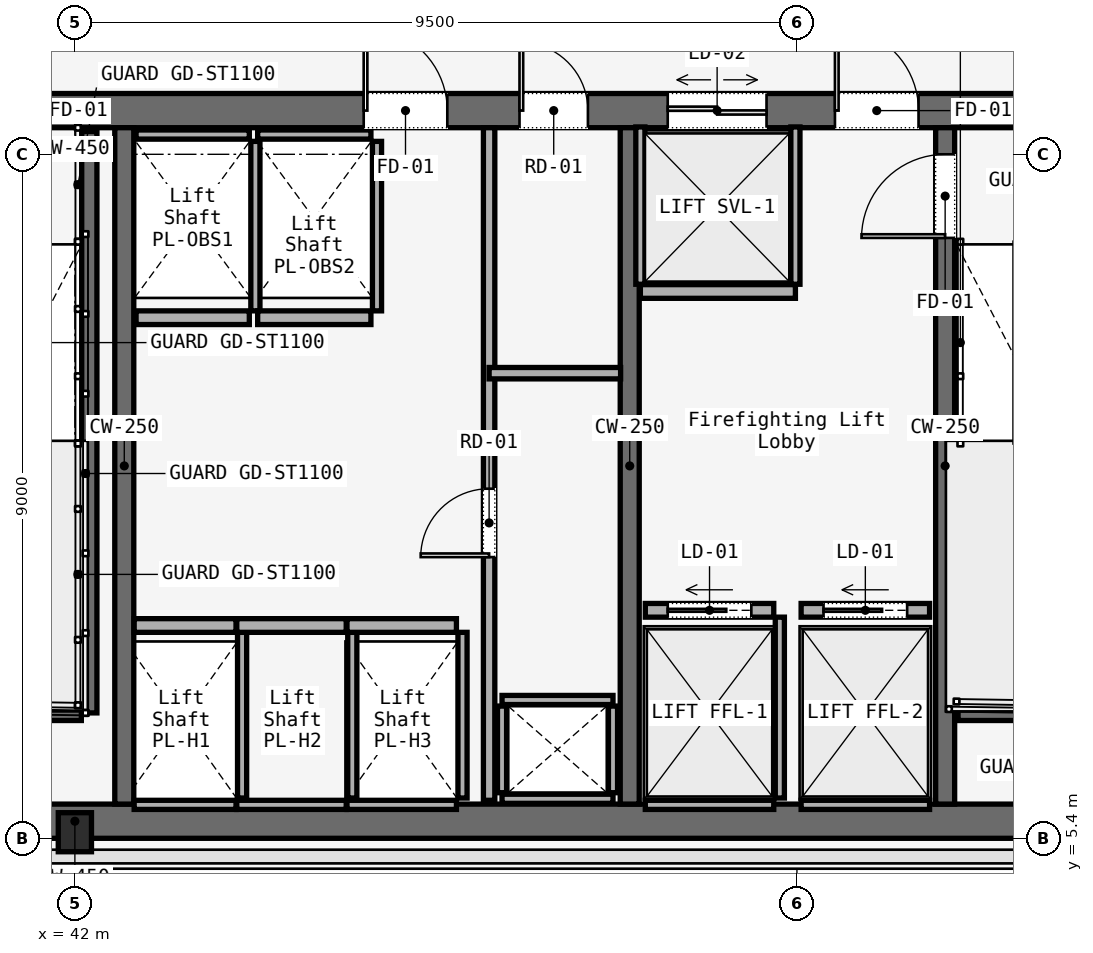
"""IFC4 building model, lengths in metres.
Left out: names, types, materials, properties, quantities, classifications, styles, units other than length and angle.
Written with IfcOpenShell. Run it as: python <this file> out.ifc"""

import sys

from ifc_helpers import new_model, si_unit, direction, frame, frame_2d, origin, origin_2d, place, context, subcontext, project, spatial, rectangle, i_section, extrude, element, fill, save


model = new_model("IFC4")
c1 = context("Model", 3, precision=1e-05, world=origin(), true_north=direction((0.0, 1.0)))
c2 = subcontext(c1, "Body", "Model", "MODEL_VIEW")
j1 = project(units=[si_unit("LENGTHUNIT", "METRE"), si_unit("PLANEANGLEUNIT", "RADIAN")], contexts=[c1])
p1 = place(None, origin())
s1 = spatial("IfcSite", under=j1, at=p1, CompositionType="ELEMENT")
p2 = place(p1, origin())
s2 = spatial("IfcBuilding", under=s1, at=p2, CompositionType="ELEMENT")
p3 = place(p2, frame((0.0, 0.0, 104.4)))
s3 = spatial("IfcBuildingStorey", under=s2, at=p3, CompositionType="ELEMENT", Elevation=104.4)
p4 = place(p3, frame((26.45, 14.975, 0.0), z_axis=(0.0, 0.0, 1.0), x_axis=(1.0, 0.0, 0.0)))
e1 = element("IfcWall", 1, at=p4, inside=s3, PredefinedType="SOLIDWALL", context=c2, shape_type="SweptSolid", body=[
    extrude(rectangle(XDim=31.1, YDim=0.45, at=frame_2d((15.55, 0.0))), origin(), (0.0, 0.0, 1.0), 3.58),
])
p5 = place(p4, frame((1.65, 0.0, 0.0)))
e2 = element("IfcOpeningElement", 2, at=p5, cuts=e1, PredefinedType="OPENING", context=c2, shape_type="SweptSolid", body=[
    extrude(rectangle(XDim=1.1, YDim=2.2, at=frame_2d((0.55, 1.1))), frame((0.0, 0.225, 0.0), z_axis=(0.0, -1.0, 0.0), x_axis=(1.0, 0.0, 0.0)), (0.0, 0.0, 1.0), 0.45),
])
p6 = place(p4, frame((13.65, 0.0, 0.0)))
e3 = element("IfcOpeningElement", 3, at=p6, cuts=e1, PredefinedType="OPENING", context=c2, shape_type="SweptSolid", body=[
    extrude(rectangle(XDim=1.1, YDim=2.2, at=frame_2d((0.55, 1.1))), frame((0.0, 0.225, 0.0), z_axis=(0.0, -1.0, 0.0), x_axis=(1.0, 0.0, 0.0)), (0.0, 0.0, 1.0), 0.45),
])
p7 = place(p4, frame((25.55, 0.0, 0.0)))
e4 = element("IfcOpeningElement", 4, at=p7, cuts=e1, PredefinedType="OPENING", context=c2, shape_type="SweptSolid", body=[
    extrude(rectangle(XDim=1.1, YDim=2.2, at=frame_2d((0.55, 1.1))), frame((0.0, 0.225, 0.0), z_axis=(0.0, -1.0, 0.0), x_axis=(1.0, 0.0, 0.0)), (0.0, 0.0, 1.0), 0.45),
])
p8 = place(p4, frame((10.7, 0.0, 0.0)))
e5 = element("IfcOpeningElement", 5, at=p8, cuts=e1, PredefinedType="OPENING", context=c2, shape_type="SweptSolid", body=[
    extrude(rectangle(XDim=1.4, YDim=2.2, at=frame_2d((0.7, 1.1))), frame((0.0, 0.225, 0.0), z_axis=(0.0, -1.0, 0.0), x_axis=(1.0, 0.0, 0.0)), (0.0, 0.0, 1.0), 0.45),
])
p9 = place(p4, frame((19.35, 0.0, 0.0)))
e6 = element("IfcOpeningElement", 6, at=p9, cuts=e1, PredefinedType="OPENING", context=c2, shape_type="SweptSolid", body=[
    extrude(rectangle(XDim=1.1, YDim=2.2, at=frame_2d((0.55, 1.1))), frame((0.0, 0.225, 0.0), z_axis=(0.0, -1.0, 0.0), x_axis=(1.0, 0.0, 0.0)), (0.0, 0.0, 1.0), 0.45),
])
p10 = place(p4, frame((21.4, 0.0, 0.0)))
e7 = element("IfcOpeningElement", 7, at=p10, cuts=e1, PredefinedType="OPENING", context=c2, shape_type="SweptSolid", body=[
    extrude(rectangle(XDim=0.9, YDim=2.1, at=frame_2d((0.45, 1.05))), frame((0.0, 0.225, 0.0), z_axis=(0.0, -1.0, 0.0), x_axis=(1.0, 0.0, 0.0)), (0.0, 0.0, 1.0), 0.45),
])
p11 = place(p4, frame((23.35, 0.0, 0.0)))
e8 = element("IfcOpeningElement", 8, at=p11, cuts=e1, PredefinedType="OPENING", context=c2, shape_type="SweptSolid", body=[
    extrude(rectangle(XDim=1.3, YDim=2.3, at=frame_2d((0.65, 1.15))), frame((0.0, 0.225, 0.0), z_axis=(0.0, -1.0, 0.0), x_axis=(1.0, 0.0, 0.0)), (0.0, 0.0, 1.0), 0.45),
])
p12 = place(p3, frame((26.45, 5.625, 0.0), z_axis=(0.0, 0.0, 1.0), x_axis=(1.0, 0.0, 0.0)))
e9 = element("IfcWall", 9, at=p12, inside=s3, PredefinedType="SOLIDWALL", context=c2, shape_type="SweptSolid", body=[
    extrude(rectangle(XDim=31.1, YDim=0.45, at=frame_2d((15.55, 0.0))), origin(), (0.0, 0.0, 1.0), 3.58),
])
for number, where, z_axis, x_axis in (
    (10, (42.65, 5.85, 0.0), (0.0, 0.0, 1.0), (0.0, 1.0, 0.0)),
    (11, (49.3, 5.85, 0.0), (0.0, 0.0, 1.0), (0.0, 1.0, 0.0)),
):
    element("IfcWall", number, at=place(p3, frame(where, z_axis=z_axis, x_axis=x_axis)), inside=s3, PredefinedType="SOLIDWALL", context=c2, shape_type="SweptSolid", body=[
        extrude(rectangle(XDim=8.9, YDim=0.25, at=frame_2d((4.45, 0.0))), origin(), (0.0, 0.0, 1.0), 3.58),
    ])
p13 = place(p3, frame((53.45, 5.85, 0.0), z_axis=(0.0, 0.0, 1.0), x_axis=(0.0, 1.0, 0.0)))
e12 = element("IfcWall", 12, at=p13, inside=s3, PredefinedType="SOLIDWALL", context=c2, shape_type="SweptSolid", body=[
    extrude(rectangle(XDim=8.9, YDim=0.25, at=frame_2d((4.45, 0.0))), origin(), (0.0, 0.0, 1.0), 3.58),
])
p14 = place(p13, frame((7.45, 0.0, 0.0)))
e13 = element("IfcOpeningElement", 13, at=p14, cuts=e12, PredefinedType="OPENING", context=c2, shape_type="SweptSolid", body=[
    extrude(rectangle(XDim=1.1, YDim=2.2, at=frame_2d((0.55, 1.1))), frame((0.0, 0.125, 0.0), z_axis=(0.0, -1.0, 0.0), x_axis=(1.0, 0.0, 0.0)), (0.0, 0.0, 1.0), 0.25),
])
p15 = place(p3, frame((42.0, 5.48, 0.0), z_axis=(0.0, 0.0, 1.0), x_axis=(1.0, 0.0, 0.0)))
e14 = element("IfcColumn", 14, at=p15, inside=s3, PredefinedType="COLUMN", context=c2, shape_type="SweptSolid", body=[
    extrude(i_section(OverallWidth=0.437, OverallDepth=0.514, WebThickness=0.061, FlangeThickness=0.077, FilletRadius=0.015, at=origin_2d()), origin(), (0.0, 0.0, 1.0), 3.58),
])
p16 = place(p3, frame((42.19, 14.7, 0.0), z_axis=(0.0, 0.0, 1.0), x_axis=(0.0, -1.0, 0.0)))
e15 = element("IfcWall", 15, at=p16, inside=s3, PredefinedType="SOLIDWALL", context=c2, shape_type="SweptSolid", body=[
    extrude(rectangle(XDim=7.65, YDim=0.2, at=frame_2d((3.825, 0.0))), origin(), (0.0, 0.0, 1.0), 3.8),
])
for number, where, z_axis, x_axis in (
    (16, (38.97, 7.05, 0.0), (0.0, 0.0, 1.0), (1.0, 0.0, 0.0)),
    (17, (53.62, 7.05, 0.0), (0.0, 0.0, 1.0), (1.0, 0.0, 0.0)),
):
    element("IfcWall", number, at=place(p3, frame(where, z_axis=z_axis, x_axis=x_axis)), inside=s3, PredefinedType="SOLIDWALL", context=c2, shape_type="SweptSolid", body=[
        extrude(rectangle(XDim=3.115, YDim=0.2, at=frame_2d((1.558, 0.0))), origin(), (0.0, 0.0, 1.0), 3.8),
    ])
for number, where, z_axis, x_axis in (
    (18, (47.62, 5.92, 0.0), (0.0, 0.0, 1.0), (1.0, 0.0, 0.0)),
    (19, (47.62, 7.22, 0.0), (0.0, 0.0, 1.0), (1.0, 0.0, 0.0)),
):
    element("IfcWall", number, at=place(p3, frame(where, z_axis=z_axis, x_axis=x_axis)), inside=s3, PredefinedType="SOLIDWALL", context=c2, shape_type="SweptSolid", body=[
        extrude(rectangle(XDim=1.46, YDim=0.12, at=frame_2d((0.73, 0.0))), origin(), (0.0, 0.0, 1.0), 2.95),
    ])
for number, where, z_axis, x_axis in (
    (20, (47.62, 6.0, 0.0), (0.0, 0.0, 1.0), (0.0, 1.0, 0.0)),
    (21, (49.08, 6.0, 0.0), (0.0, 0.0, 1.0), (0.0, 1.0, 0.0)),
):
    element("IfcWall", number, at=place(p3, frame(where, z_axis=z_axis, x_axis=x_axis)), inside=s3, PredefinedType="SOLIDWALL", context=c2, shape_type="SweptSolid", body=[
        extrude(rectangle(XDim=1.14, YDim=0.12, at=frame_2d((0.57, 0.0))), origin(), (0.0, 0.0, 1.0), 2.95),
    ])
p17 = place(p3, frame((47.45, 5.9, 0.0), z_axis=(0.0, 0.0, 1.0), x_axis=(0.0, 1.0, 0.0)))
e22 = element("IfcWall", 22, at=p17, inside=s3, PredefinedType="PARTITIONING", context=c2, shape_type="SweptSolid", body=[
    extrude(rectangle(XDim=8.85, YDim=0.15, at=frame_2d((4.425, 0.0))), origin(), (0.0, 0.0, 1.0), 2.95),
])
p18 = place(p17, frame((3.2, 0.0, 0.0)))
e23 = element("IfcOpeningElement", 23, at=p18, cuts=e22, PredefinedType="OPENING", context=c2, shape_type="SweptSolid", body=[
    extrude(rectangle(XDim=0.9, YDim=2.1, at=frame_2d((0.45, 1.05))), frame((0.0, 0.075, 0.0), z_axis=(0.0, -1.0, 0.0), x_axis=(1.0, 0.0, 0.0)), (0.0, 0.0, 1.0), 0.15),
])
p19 = place(p3, frame((47.45, 11.52, 0.0), z_axis=(0.0, 0.0, 1.0), x_axis=(1.0, 0.0, 0.0)))
e24 = element("IfcWall", 24, at=p19, inside=s3, PredefinedType="PARTITIONING", context=c2, shape_type="SweptSolid", body=[
    extrude(rectangle(XDim=1.73, YDim=0.15, at=frame_2d((0.865, 0.0))), origin(), (0.0, 0.0, 1.0), 2.95),
])
p20 = place(p3, frame((42.78, 8.2, 0.0), z_axis=(0.0, 0.0, 1.0), x_axis=(1.0, 0.0, 0.0)))
e25 = element("IfcWall", 25, at=p20, inside=s3, PredefinedType="SOLIDWALL", context=c2, shape_type="SweptSolid", body=[
    extrude(rectangle(XDim=1.34, YDim=0.18, at=frame_2d((0.67, 0.0))), origin(), (0.0, 0.0, 1.0), 2.95),
])
p21 = place(p3, frame((42.78, 5.84, 0.0), z_axis=(0.0, 0.0, 1.0), x_axis=(1.0, 0.0, 0.0)))
e26 = element("IfcWall", 26, at=p21, inside=s3, PredefinedType="SOLIDWALL", context=c2, shape_type="SweptSolid", body=[
    extrude(rectangle(XDim=1.34, YDim=0.12, at=frame_2d((0.67, 0.0))), origin(), (0.0, 0.0, 1.0), 2.95),
])
p22 = place(p3, frame((44.2, 5.93, 0.0), z_axis=(0.0, 0.0, 1.0), x_axis=(0.0, 1.0, 0.0)))
e27 = element("IfcWall", 27, at=p22, inside=s3, PredefinedType="SOLIDWALL", context=c2, shape_type="SweptSolid", body=[
    extrude(rectangle(XDim=2.18, YDim=0.12, at=frame_2d((1.09, 0.0))), origin(), (0.0, 0.0, 1.0), 2.95),
])
p23 = place(p3, frame((44.13, 8.2, 0.0), z_axis=(0.0, 0.0, 1.0), x_axis=(1.0, 0.0, 0.0)))
e28 = element("IfcWall", 28, at=p23, inside=s3, PredefinedType="SOLIDWALL", context=c2, shape_type="SweptSolid", body=[
    extrude(rectangle(XDim=1.44, YDim=0.18, at=frame_2d((0.72, 0.0))), origin(), (0.0, 0.0, 1.0), 2.95),
])
p24 = place(p3, frame((44.13, 5.84, 0.0), z_axis=(0.0, 0.0, 1.0), x_axis=(1.0, 0.0, 0.0)))
e29 = element("IfcWall", 29, at=p24, inside=s3, PredefinedType="SOLIDWALL", context=c2, shape_type="SweptSolid", body=[
    extrude(rectangle(XDim=1.44, YDim=0.12, at=frame_2d((0.72, 0.0))), origin(), (0.0, 0.0, 1.0), 2.95),
])
p25 = place(p3, frame((45.65, 5.93, 0.0), z_axis=(0.0, 0.0, 1.0), x_axis=(0.0, 1.0, 0.0)))
e30 = element("IfcWall", 30, at=p25, inside=s3, PredefinedType="SOLIDWALL", context=c2, shape_type="SweptSolid", body=[
    extrude(rectangle(XDim=2.18, YDim=0.12, at=frame_2d((1.09, 0.0))), origin(), (0.0, 0.0, 1.0), 2.95),
])
p26 = place(p3, frame((45.58, 8.2, 0.0), z_axis=(0.0, 0.0, 1.0), x_axis=(1.0, 0.0, 0.0)))
e31 = element("IfcWall", 31, at=p26, inside=s3, PredefinedType="SOLIDWALL", context=c2, shape_type="SweptSolid", body=[
    extrude(rectangle(XDim=1.44, YDim=0.18, at=frame_2d((0.72, 0.0))), origin(), (0.0, 0.0, 1.0), 2.95),
])
p27 = place(p3, frame((45.58, 5.84, 0.0), z_axis=(0.0, 0.0, 1.0), x_axis=(1.0, 0.0, 0.0)))
e32 = element("IfcWall", 32, at=p27, inside=s3, PredefinedType="SOLIDWALL", context=c2, shape_type="SweptSolid", body=[
    extrude(rectangle(XDim=1.44, YDim=0.12, at=frame_2d((0.72, 0.0))), origin(), (0.0, 0.0, 1.0), 2.95),
])
p28 = place(p3, frame((47.1, 5.93, 0.0), z_axis=(0.0, 0.0, 1.0), x_axis=(0.0, 1.0, 0.0)))
e33 = element("IfcWall", 33, at=p28, inside=s3, PredefinedType="SOLIDWALL", context=c2, shape_type="SweptSolid", body=[
    extrude(rectangle(XDim=2.18, YDim=0.12, at=frame_2d((1.09, 0.0))), origin(), (0.0, 0.0, 1.0), 2.95),
])
p29 = place(p3, frame((42.805, 12.25, 0.0), z_axis=(0.0, 0.0, 1.0), x_axis=(1.0, 0.0, 0.0)))
e34 = element("IfcWall", 34, at=p29, inside=s3, PredefinedType="SOLIDWALL", context=c2, shape_type="SweptSolid", body=[
    extrude(rectangle(XDim=1.49, YDim=0.18, at=frame_2d((0.745, 0.0))), origin(), (0.0, 0.0, 1.0), 2.95),
])
p30 = place(p3, frame((42.805, 14.66, 0.0), z_axis=(0.0, 0.0, 1.0), x_axis=(1.0, 0.0, 0.0)))
e35 = element("IfcWall", 35, at=p30, inside=s3, PredefinedType="SOLIDWALL", context=c2, shape_type="SweptSolid", body=[
    extrude(rectangle(XDim=1.49, YDim=0.12, at=frame_2d((0.745, 0.0))), origin(), (0.0, 0.0, 1.0), 2.95),
])
p31 = place(p3, frame((44.375, 12.34, 0.0), z_axis=(0.0, 0.0, 1.0), x_axis=(0.0, 1.0, 0.0)))
e36 = element("IfcWall", 36, at=p31, inside=s3, PredefinedType="SOLIDWALL", context=c2, shape_type="SweptSolid", body=[
    extrude(rectangle(XDim=2.23, YDim=0.12, at=frame_2d((1.115, 0.0))), origin(), (0.0, 0.0, 1.0), 2.95),
])
p32 = place(p3, frame((44.405, 12.25, 0.0), z_axis=(0.0, 0.0, 1.0), x_axis=(1.0, 0.0, 0.0)))
e37 = element("IfcWall", 37, at=p32, inside=s3, PredefinedType="SOLIDWALL", context=c2, shape_type="SweptSolid", body=[
    extrude(rectangle(XDim=1.49, YDim=0.18, at=frame_2d((0.745, 0.0))), origin(), (0.0, 0.0, 1.0), 2.95),
])
p33 = place(p3, frame((44.405, 14.66, 0.0), z_axis=(0.0, 0.0, 1.0), x_axis=(1.0, 0.0, 0.0)))
e38 = element("IfcWall", 38, at=p33, inside=s3, PredefinedType="SOLIDWALL", context=c2, shape_type="SweptSolid", body=[
    extrude(rectangle(XDim=1.49, YDim=0.12, at=frame_2d((0.745, 0.0))), origin(), (0.0, 0.0, 1.0), 2.95),
])
p34 = place(p3, frame((45.975, 12.34, 0.0), z_axis=(0.0, 0.0, 1.0), x_axis=(0.0, 1.0, 0.0)))
e39 = element("IfcWall", 39, at=p34, inside=s3, PredefinedType="SOLIDWALL", context=c2, shape_type="SweptSolid", body=[
    extrude(rectangle(XDim=2.23, YDim=0.12, at=frame_2d((1.115, 0.0))), origin(), (0.0, 0.0, 1.0), 2.95),
])
p35 = place(p3, frame((49.505, 8.4, 0.0), z_axis=(0.0, 0.0, 1.0), x_axis=(1.0, 0.0, 0.0)))
e40 = element("IfcWall", 40, at=p35, inside=s3, PredefinedType="SOLIDWALL", context=c2, shape_type="SweptSolid", body=[
    extrude(rectangle(XDim=1.69, YDim=0.18, at=frame_2d((0.845, 0.0))), origin(), (0.0, 0.0, 1.0), 2.95),
])
p36 = place(p35, frame((0.295, 0.0, 0.0)))
e41 = element("IfcOpeningElement", 41, at=p36, cuts=e40, PredefinedType="OPENING", context=c2, shape_type="SweptSolid", body=[
    extrude(rectangle(XDim=1.1, YDim=2.2, at=frame_2d((0.55, 1.1))), frame((0.0, 0.09, 0.0), z_axis=(0.0, -1.0, 0.0), x_axis=(1.0, 0.0, 0.0)), (0.0, 0.0, 1.0), 0.18),
])
p37 = place(p3, frame((49.505, 5.84, 0.0), z_axis=(0.0, 0.0, 1.0), x_axis=(1.0, 0.0, 0.0)))
e42 = element("IfcWall", 42, at=p37, inside=s3, PredefinedType="SOLIDWALL", context=c2, shape_type="SweptSolid", body=[
    extrude(rectangle(XDim=1.69, YDim=0.12, at=frame_2d((0.845, 0.0))), origin(), (0.0, 0.0, 1.0), 2.95),
])
p38 = place(p3, frame((51.275, 5.93, 0.0), z_axis=(0.0, 0.0, 1.0), x_axis=(0.0, 1.0, 0.0)))
e43 = element("IfcWall", 43, at=p38, inside=s3, PredefinedType="SOLIDWALL", context=c2, shape_type="SweptSolid", body=[
    extrude(rectangle(XDim=2.38, YDim=0.12, at=frame_2d((1.19, 0.0))), origin(), (0.0, 0.0, 1.0), 2.95),
])
p39 = place(p3, frame((51.555, 8.4, 0.0), z_axis=(0.0, 0.0, 1.0), x_axis=(1.0, 0.0, 0.0)))
e44 = element("IfcWall", 44, at=p39, inside=s3, PredefinedType="SOLIDWALL", context=c2, shape_type="SweptSolid", body=[
    extrude(rectangle(XDim=1.69, YDim=0.18, at=frame_2d((0.845, 0.0))), origin(), (0.0, 0.0, 1.0), 2.95),
])
p40 = place(p39, frame((0.295, 0.0, 0.0)))
e45 = element("IfcOpeningElement", 45, at=p40, cuts=e44, PredefinedType="OPENING", context=c2, shape_type="SweptSolid", body=[
    extrude(rectangle(XDim=1.1, YDim=2.2, at=frame_2d((0.55, 1.1))), frame((0.0, 0.09, 0.0), z_axis=(0.0, -1.0, 0.0), x_axis=(1.0, 0.0, 0.0)), (0.0, 0.0, 1.0), 0.18),
])
p41 = place(p3, frame((51.555, 5.84, 0.0), z_axis=(0.0, 0.0, 1.0), x_axis=(1.0, 0.0, 0.0)))
e46 = element("IfcWall", 46, at=p41, inside=s3, PredefinedType="SOLIDWALL", context=c2, shape_type="SweptSolid", body=[
    extrude(rectangle(XDim=1.69, YDim=0.12, at=frame_2d((0.845, 0.0))), origin(), (0.0, 0.0, 1.0), 2.95),
])
p42 = place(p3, frame((49.44, 12.595, 0.0), z_axis=(0.0, 0.0, 1.0), x_axis=(1.0, 0.0, 0.0)))
e47 = element("IfcWall", 47, at=p42, inside=s3, PredefinedType="SOLIDWALL", context=c2, shape_type="SweptSolid", body=[
    extrude(rectangle(XDim=2.04, YDim=0.18, at=frame_2d((1.02, 0.0))), origin(), (0.0, 0.0, 1.0), 2.95),
])
for number, where, z_axis, x_axis in (
    (48, (49.44, 12.69, 0.0), (0.0, 0.0, 1.0), (0.0, 1.0, 0.0)),
    (49, (51.48, 12.69, 0.0), (0.0, 0.0, 1.0), (0.0, 1.0, 0.0)),
):
    element("IfcWall", number, at=place(p3, frame(where, z_axis=z_axis, x_axis=x_axis)), inside=s3, PredefinedType="SOLIDWALL", context=c2, shape_type="SweptSolid", body=[
        extrude(rectangle(XDim=2.07, YDim=0.12, at=frame_2d((1.035, 0.0))), origin(), (0.0, 0.0, 1.0), 2.95),
    ])
p43 = place(p7, origin())
e50 = element("IfcDoor", 50, at=p43, inside=s3, OperationType="SINGLE_SWING_RIGHT", PredefinedType="DOOR", context=c2, shape_type="SweptSolid", body=[
    extrude(rectangle(XDim=1.1, YDim=2.2, at=frame_2d((0.55, 1.1))), frame((0.0, 0.025, 0.0), z_axis=(0.0, -1.0, 0.0), x_axis=(1.0, 0.0, 0.0)), (0.0, 0.0, 1.0), 0.05),
])
fill(e4, e50)
p44 = place(p9, origin())
e51 = element("IfcDoor", 51, at=p44, inside=s3, OperationType="SINGLE_SWING_LEFT", PredefinedType="DOOR", context=c2, shape_type="SweptSolid", body=[
    extrude(rectangle(XDim=1.1, YDim=2.2, at=frame_2d((0.55, 1.1))), frame((0.0, 0.025, 0.0), z_axis=(0.0, -1.0, 0.0), x_axis=(1.0, 0.0, 0.0)), (0.0, 0.0, 1.0), 0.05),
])
fill(e6, e51)
p45 = place(p10, origin())
e52 = element("IfcDoor", 52, at=p45, inside=s3, OperationType="SINGLE_SWING_LEFT", PredefinedType="DOOR", context=c2, shape_type="SweptSolid", body=[
    extrude(rectangle(XDim=0.9, YDim=2.1, at=frame_2d((0.45, 1.05))), frame((0.0, 0.025, 0.0), z_axis=(0.0, -1.0, 0.0), x_axis=(1.0, 0.0, 0.0)), (0.0, 0.0, 1.0), 0.05),
])
fill(e7, e52)
p46 = place(p14, origin())
e53 = element("IfcDoor", 53, at=p46, inside=s3, OperationType="SINGLE_SWING_LEFT", PredefinedType="DOOR", context=c2, shape_type="SweptSolid", body=[
    extrude(rectangle(XDim=1.1, YDim=2.2, at=frame_2d((0.55, 1.1))), frame((0.0, 0.025, 0.0), z_axis=(0.0, -1.0, 0.0), x_axis=(1.0, 0.0, 0.0)), (0.0, 0.0, 1.0), 0.05),
])
fill(e13, e53)
p47 = place(p18, origin())
e54 = element("IfcDoor", 54, at=p47, inside=s3, OperationType="SINGLE_SWING_LEFT", PredefinedType="DOOR", context=c2, shape_type="SweptSolid", body=[
    extrude(rectangle(XDim=0.9, YDim=2.1, at=frame_2d((0.45, 1.05))), frame((0.0, 0.025, 0.0), z_axis=(0.0, -1.0, 0.0), x_axis=(1.0, 0.0, 0.0)), (0.0, 0.0, 1.0), 0.05),
])
fill(e23, e54)
p48 = place(p36, origin())
e55 = element("IfcDoor", 55, at=p48, inside=s3, OperationType="SLIDING_TO_LEFT", PredefinedType="DOOR", context=c2, shape_type="SweptSolid", body=[
    extrude(rectangle(XDim=1.1, YDim=2.2, at=frame_2d((0.55, 1.1))), frame((0.0, 0.025, 0.0), z_axis=(0.0, -1.0, 0.0), x_axis=(1.0, 0.0, 0.0)), (0.0, 0.0, 1.0), 0.05),
])
fill(e41, e55)
p49 = place(p40, origin())
e56 = element("IfcDoor", 56, at=p49, inside=s3, OperationType="SLIDING_TO_LEFT", PredefinedType="DOOR", context=c2, shape_type="SweptSolid", body=[
    extrude(rectangle(XDim=1.1, YDim=2.2, at=frame_2d((0.55, 1.1))), frame((0.0, 0.025, 0.0), z_axis=(0.0, -1.0, 0.0), x_axis=(1.0, 0.0, 0.0)), (0.0, 0.0, 1.0), 0.05),
])
fill(e45, e56)
p50 = place(p11, origin())
e57 = element("IfcDoor", 57, at=p50, inside=s3, OperationType="DOUBLE_DOOR_SLIDING", PredefinedType="DOOR", context=c2, shape_type="SweptSolid", body=[
    extrude(rectangle(XDim=1.3, YDim=2.3, at=frame_2d((0.65, 1.15))), frame((0.0, 0.025, 0.0), z_axis=(0.0, -1.0, 0.0), x_axis=(1.0, 0.0, 0.0)), (0.0, 0.0, 1.0), 0.05),
])
fill(e8, e57)
save(model, sys.argv[1])
